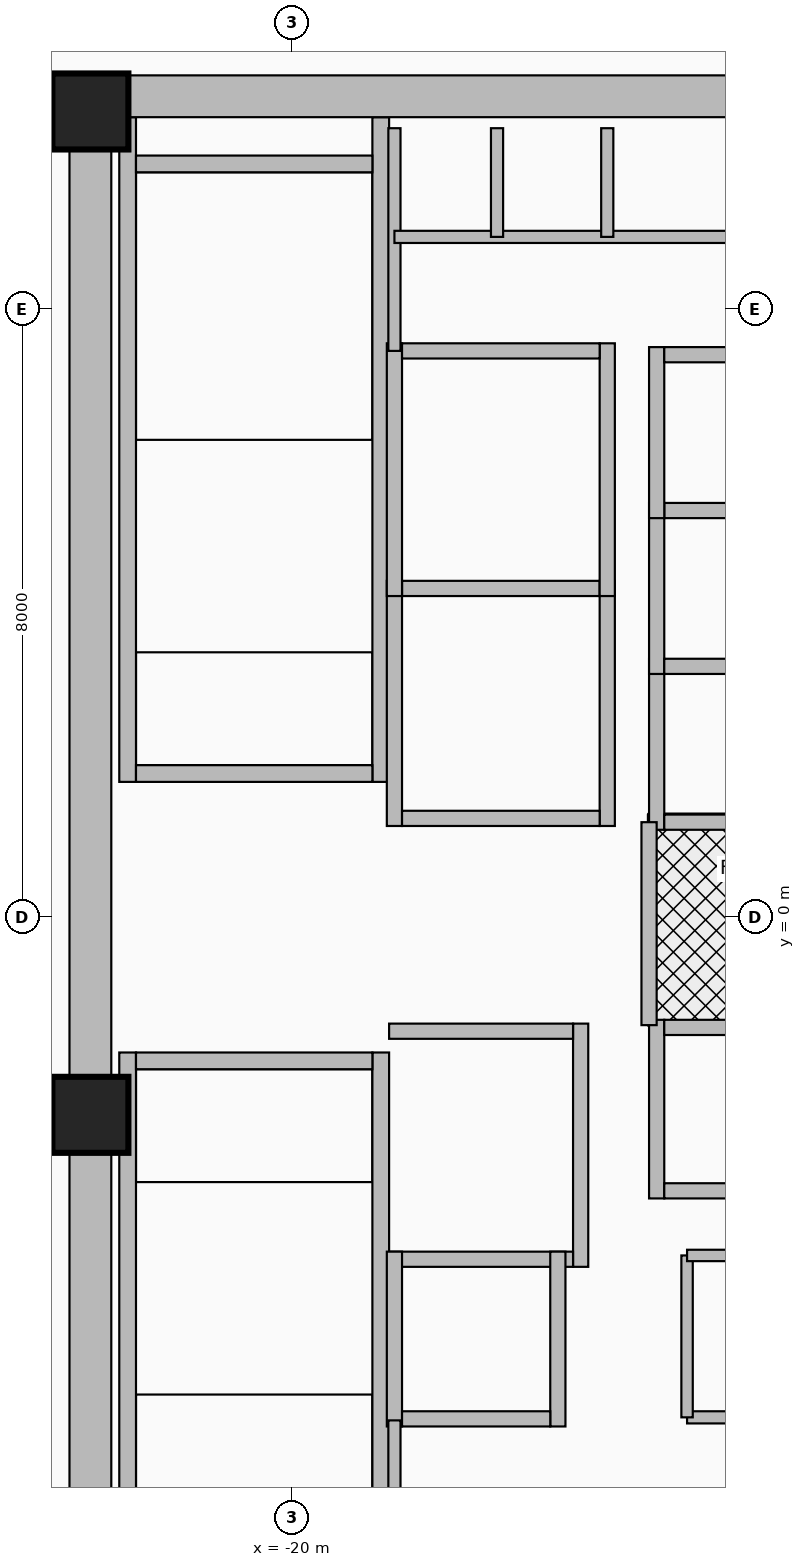
"""IFC4 building model, lengths in metres.
Left out: names, types, materials, properties, quantities, classifications, styles, units other than length and angle.
Written with IfcOpenShell. Run it as: python <this file> out.ifc"""

import sys

from ifc_helpers import new_model, si_unit, direction, frame, frame_2d, origin, origin_2d, place, context, subcontext, project, spatial, rectangle, extrude, source, transform, mapped, element, fill, save


model = new_model("IFC4")
c1 = context("Model", 3, precision=1e-05, world=origin(), true_north=direction((0.0, 1.0)))
c2 = subcontext(c1, "Body", "Model", "MODEL_VIEW")
j1 = project(units=[si_unit("LENGTHUNIT", "METRE"), si_unit("PLANEANGLEUNIT", "RADIAN")], contexts=[c1])
p1 = place(None, origin())
s1 = spatial("IfcSite", under=j1, at=p1, CompositionType="ELEMENT")
p2 = place(p1, origin())
s2 = spatial("IfcBuilding", under=s1, at=p2, CompositionType="ELEMENT")
p3 = place(p2, frame((0.0, 0.0, 180.5)))
s3 = spatial("IfcBuildingStorey", under=s2, at=p3, CompositionType="ELEMENT", Elevation=180.5)
for number, where, z_axis, x_axis in (
    (1, (-22.16, 1.78, 0.0), (0.0, 0.0, 1.0), (0.0, 1.0, 0.0)),
    (2, (-18.83, 1.78, 0.0), (0.0, 0.0, 1.0), (0.0, 1.0, 0.0)),
):
    element("IfcWall", number, at=place(p3, frame(where, z_axis=z_axis, x_axis=x_axis)), inside=s3, PredefinedType="SHEAR", context=c2, shape_type="SweptSolid", body=[
        extrude(rectangle(XDim=8.745, YDim=0.22, at=frame_2d((4.373, 0.0))), origin(), (0.0, 0.0, 1.0), 3.63),
    ])
p4 = place(p3, frame((-22.05, 1.89, 0.0), z_axis=(0.0, 0.0, 1.0), x_axis=(1.0, 0.0, 0.0)))
e3 = element("IfcWall", 3, at=p4, inside=s3, PredefinedType="SHEAR", context=c2, shape_type="SweptSolid", body=[
    extrude(rectangle(XDim=3.11, YDim=0.22, at=frame_2d((1.555, 0.0))), origin(), (0.0, 0.0, 1.0), 3.63),
])
p5 = place(p4, frame((1.0, 0.0, 0.0)))
e4 = element("IfcOpeningElement", 4, at=p5, cuts=e3, PredefinedType="OPENING", context=c2, shape_type="SweptSolid", body=[
    extrude(rectangle(XDim=1.1, YDim=2.15, at=frame_2d((0.55, 1.075))), frame((0.0, 0.125, 0.0), z_axis=(0.0, -1.0, 0.0), x_axis=(1.0, 0.0, 0.0)), (0.0, 0.0, 1.0), 0.25),
])
p6 = place(p3, frame((-22.05, 9.91, 0.0), z_axis=(0.0, 0.0, 1.0), x_axis=(1.0, 0.0, 0.0)))
e5 = element("IfcWall", 5, at=p6, inside=s3, PredefinedType="SHEAR", context=c2, shape_type="SweptSolid", body=[
    extrude(rectangle(XDim=3.11, YDim=0.22, at=frame_2d((1.555, 0.0))), origin(), (0.0, 0.0, 1.0), 3.63),
])
for number, where, z_axis, x_axis in (
    (6, (-22.16, -10.525, 0.0), (0.0, 0.0, 1.0), (0.0, 1.0, 0.0)),
    (7, (-18.83, -10.525, 0.0), (0.0, 0.0, 1.0), (0.0, 1.0, 0.0)),
):
    element("IfcWall", number, at=place(p3, frame(where, z_axis=z_axis, x_axis=x_axis)), inside=s3, PredefinedType="SHEAR", context=c2, shape_type="SweptSolid", body=[
        extrude(rectangle(XDim=8.745, YDim=0.22, at=frame_2d((4.373, 0.0))), origin(), (0.0, 0.0, 1.0), 3.63),
    ])
p7 = place(p3, frame((-22.05, -1.89, 0.0), z_axis=(0.0, 0.0, 1.0), x_axis=(1.0, 0.0, 0.0)))
e8 = element("IfcWall", 8, at=p7, inside=s3, PredefinedType="SHEAR", context=c2, shape_type="SweptSolid", body=[
    extrude(rectangle(XDim=3.11, YDim=0.22, at=frame_2d((1.555, 0.0))), origin(), (0.0, 0.0, 1.0), 3.63),
])
p8 = place(p7, frame((1.0, 0.0, 0.0)))
e9 = element("IfcOpeningElement", 9, at=p8, cuts=e8, PredefinedType="OPENING", context=c2, shape_type="SweptSolid", body=[
    extrude(rectangle(XDim=1.1, YDim=2.15, at=frame_2d((0.55, 1.075))), frame((0.0, 0.125, 0.0), z_axis=(0.0, -1.0, 0.0), x_axis=(1.0, 0.0, 0.0)), (0.0, 0.0, 1.0), 0.25),
])
p9 = place(p3, frame((-22.65, -11.075, 0.0), z_axis=(0.0, 0.0, 1.0), x_axis=(0.0, 1.0, 0.0)))
e10 = element("IfcWall", 10, at=p9, inside=s3, PredefinedType="SHEAR", context=c2, shape_type="SweptSolid", body=[
    extrude(rectangle(XDim=22.15, YDim=0.55, at=frame_2d((11.075, 0.0))), origin(), (0.0, 0.0, 1.0), 3.63),
])
p10 = place(p3, frame((-22.65, 10.8, 0.0), z_axis=(0.0, 0.0, 1.0), x_axis=(1.0, 0.0, 0.0)))
e11 = element("IfcWall", 11, at=p10, inside=s3, PredefinedType="SHEAR", context=c2, shape_type="SweptSolid", body=[
    extrude(rectangle(XDim=10.25, YDim=0.55, at=frame_2d((5.125, 0.0))), origin(), (0.0, 0.0, 1.0), 3.63),
])
m1 = source(origin(), c2, "Body", "SweptSolid", [
    extrude(rectangle(XDim=1.0, YDim=1.0, at=origin_2d()), origin(), (0.0, 0.0, 1.0), 3.95),
])
for number, where, z_axis, x_axis in (
    (12, (-22.65, -2.6, 0.0), (0.0, 0.0, 1.0), (1.0, 0.0, 0.0)),
    (13, (-22.65, 10.6, 0.0), (0.0, 0.0, 1.0), (1.0, 0.0, 0.0)),
):
    element("IfcColumn", number, at=place(p3, frame(where, z_axis=z_axis, x_axis=x_axis)), inside=s3, PredefinedType="COLUMN", context=c2, shape_type="MappedRepresentation", body=[
        mapped(m1, transform((0.0, 0.0, 0.0), x_axis=(1.0, 0.0, 0.0), y_axis=(0.0, 1.0, 0.0), z_axis=(0.0, 0.0, 1.0), scale=1.0)),
    ])
for number, where, z_axis, x_axis in (
    (14, (-18.65, 1.2, 0.0), (0.0, 0.0, 1.0), (0.0, 1.0, 0.0)),
    (15, (-15.85, 1.2, 0.0), (0.0, 0.0, 1.0), (0.0, 1.0, 0.0)),
):
    element("IfcWall", number, at=place(p3, frame(where, z_axis=z_axis, x_axis=x_axis)), inside=s3, PredefinedType="MOVABLE", context=c2, shape_type="SweptSolid", body=[
        extrude(rectangle(XDim=3.225, YDim=0.2, at=frame_2d((1.613, 0.0))), origin(), (0.0, 0.0, 1.0), 3.63),
    ])
p11 = place(p3, frame((-18.55, 1.3, 0.0), z_axis=(0.0, 0.0, 1.0), x_axis=(1.0, 0.0, 0.0)))
e16 = element("IfcWall", 16, at=p11, inside=s3, PredefinedType="MOVABLE", context=c2, shape_type="SweptSolid", body=[
    extrude(rectangle(XDim=2.6, YDim=0.2, at=frame_2d((1.3, 0.0))), origin(), (0.0, 0.0, 1.0), 3.63),
])
p12 = place(p11, frame((0.7, 0.0, 0.0)))
e17 = element("IfcOpeningElement", 17, at=p12, cuts=e16, PredefinedType="OPENING", context=c2, shape_type="SweptSolid", body=[
    extrude(rectangle(XDim=1.2, YDim=2.1, at=frame_2d((0.6, 1.05))), frame((0.0, 0.115, 0.0), z_axis=(0.0, -1.0, 0.0), x_axis=(1.0, 0.0, 0.0)), (0.0, 0.0, 1.0), 0.23),
])
p13 = place(p3, frame((-18.55, 4.325, 0.0), z_axis=(0.0, 0.0, 1.0), x_axis=(1.0, 0.0, 0.0)))
e18 = element("IfcWall", 18, at=p13, inside=s3, PredefinedType="MOVABLE", context=c2, shape_type="SweptSolid", body=[
    extrude(rectangle(XDim=2.6, YDim=0.2, at=frame_2d((1.3, 0.0))), origin(), (0.0, 0.0, 1.0), 3.63),
])
p14 = place(p3, frame((-16.2, -4.6, 0.0), z_axis=(0.0, 0.0, 1.0), x_axis=(0.0, 1.0, 0.0)))
e19 = element("IfcWall", 19, at=p14, inside=s3, PredefinedType="MOVABLE", context=c2, shape_type="SweptSolid", body=[
    extrude(rectangle(XDim=3.2, YDim=0.2, at=frame_2d((1.6, 0.0))), origin(), (0.0, 0.0, 1.0), 3.63),
])
p15 = place(p3, frame((-18.72, -4.5, 0.0), z_axis=(0.0, 0.0, 1.0), x_axis=(1.0, 0.0, 0.0)))
e20 = element("IfcWall", 20, at=p15, inside=s3, PredefinedType="MOVABLE", context=c2, shape_type="SweptSolid", body=[
    extrude(rectangle(XDim=2.42, YDim=0.2, at=frame_2d((1.21, 0.0))), origin(), (0.0, 0.0, 1.0), 3.63),
])
p16 = place(p3, frame((-18.72, -1.5, 0.0), z_axis=(0.0, 0.0, 1.0), x_axis=(1.0, 0.0, 0.0)))
e21 = element("IfcWall", 21, at=p16, inside=s3, PredefinedType="MOVABLE", context=c2, shape_type="SweptSolid", body=[
    extrude(rectangle(XDim=2.42, YDim=0.2, at=frame_2d((1.21, 0.0))), origin(), (0.0, 0.0, 1.0), 3.63),
])
p17 = place(p16, frame((0.61, 0.0, 0.0)))
e22 = element("IfcOpeningElement", 22, at=p17, cuts=e21, PredefinedType="OPENING", context=c2, shape_type="SweptSolid", body=[
    extrude(rectangle(XDim=1.2, YDim=2.1, at=frame_2d((0.6, 1.05))), frame((0.0, 0.115, 0.0), z_axis=(0.0, -1.0, 0.0), x_axis=(1.0, 0.0, 0.0)), (0.0, 0.0, 1.0), 0.23),
])
for number, where, z_axis, x_axis in (
    (23, (-18.65, 4.225, 0.0), (0.0, 0.0, 1.0), (0.0, 1.0, 0.0)),
    (24, (-15.85, 4.225, 0.0), (0.0, 0.0, 1.0), (0.0, 1.0, 0.0)),
):
    element("IfcWall", number, at=place(p3, frame(where, z_axis=z_axis, x_axis=x_axis)), inside=s3, PredefinedType="MOVABLE", context=c2, shape_type="SweptSolid", body=[
        extrude(rectangle(XDim=3.325, YDim=0.2, at=frame_2d((1.663, 0.0))), origin(), (0.0, 0.0, 1.0), 3.63),
    ])
p18 = place(p3, frame((-18.55, 7.45, 0.0), z_axis=(0.0, 0.0, 1.0), x_axis=(1.0, 0.0, 0.0)))
e25 = element("IfcWall", 25, at=p18, inside=s3, PredefinedType="MOVABLE", context=c2, shape_type="SweptSolid", body=[
    extrude(rectangle(XDim=2.6, YDim=0.2, at=frame_2d((1.3, 0.0))), origin(), (0.0, 0.0, 1.0), 3.63),
])
p19 = place(p18, frame((0.7, 0.0, 0.0)))
e26 = element("IfcOpeningElement", 26, at=p19, cuts=e25, PredefinedType="OPENING", context=c2, shape_type="SweptSolid", body=[
    extrude(rectangle(XDim=1.2, YDim=2.1, at=frame_2d((0.6, 1.05))), frame((0.0, 0.115, 0.0), z_axis=(0.0, -1.0, 0.0), x_axis=(1.0, 0.0, 0.0)), (0.0, 0.0, 1.0), 0.23),
])
p20 = place(p3, frame((-15.2, 1.15, 0.0), z_axis=(0.0, 0.0, 1.0), x_axis=(0.0, 1.0, 0.0)))
e27 = element("IfcWall", 27, at=p20, inside=s3, PredefinedType="MOVABLE", context=c2, shape_type="SweptSolid", body=[
    extrude(rectangle(XDim=2.25, YDim=0.2, at=frame_2d((1.125, 0.0))), origin(), (0.0, 0.0, 1.0), 3.63),
])
p21 = place(p3, frame((-15.1, 1.25, 0.0), z_axis=(0.0, 0.0, 1.0), x_axis=(1.0, 0.0, 0.0)))
e28 = element("IfcWall", 28, at=p21, inside=s3, PredefinedType="MOVABLE", context=c2, shape_type="SweptSolid", body=[
    extrude(rectangle(XDim=1.92, YDim=0.2, at=frame_2d((0.96, 0.0))), origin(), (0.0, 0.0, 1.0), 3.63),
])
p22 = place(p3, frame((-15.2, 3.2, 0.0), z_axis=(0.0, 0.0, 1.0), x_axis=(0.0, 1.0, 0.0)))
e29 = element("IfcWall", 29, at=p22, inside=s3, PredefinedType="MOVABLE", context=c2, shape_type="SweptSolid", body=[
    extrude(rectangle(XDim=2.25, YDim=0.2, at=frame_2d((1.125, 0.0))), origin(), (0.0, 0.0, 1.0), 3.63),
])
for number, where, z_axis, x_axis in (
    (30, (-15.1, 3.3, 0.0), (0.0, 0.0, 1.0), (1.0, 0.0, 0.0)),
    (31, (-15.1, 5.35, 0.0), (0.0, 0.0, 1.0), (1.0, 0.0, 0.0)),
):
    element("IfcWall", number, at=place(p3, frame(where, z_axis=z_axis, x_axis=x_axis)), inside=s3, PredefinedType="MOVABLE", context=c2, shape_type="SweptSolid", body=[
        extrude(rectangle(XDim=1.92, YDim=0.2, at=frame_2d((0.96, 0.0))), origin(), (0.0, 0.0, 1.0), 3.63),
    ])
p23 = place(p3, frame((-15.2, 5.25, 0.0), z_axis=(0.0, 0.0, 1.0), x_axis=(0.0, 1.0, 0.0)))
e32 = element("IfcWall", 32, at=p23, inside=s3, PredefinedType="MOVABLE", context=c2, shape_type="SweptSolid", body=[
    extrude(rectangle(XDim=2.25, YDim=0.2, at=frame_2d((1.125, 0.0))), origin(), (0.0, 0.0, 1.0), 3.63),
])
p24 = place(p3, frame((-15.1, 7.4, 0.0), z_axis=(0.0, 0.0, 1.0), x_axis=(1.0, 0.0, 0.0)))
e33 = element("IfcWall", 33, at=p24, inside=s3, PredefinedType="MOVABLE", context=c2, shape_type="SweptSolid", body=[
    extrude(rectangle(XDim=1.92, YDim=0.2, at=frame_2d((0.96, 0.0))), origin(), (0.0, 0.0, 1.0), 3.63),
])
for number, where, z_axis, x_axis in (
    (34, (-18.65, -6.7, 0.0), (0.0, 0.0, 1.0), (0.0, 1.0, 0.0)),
    (35, (-16.5, -6.7, 0.0), (0.0, 0.0, 1.0), (0.0, 1.0, 0.0)),
):
    element("IfcWall", number, at=place(p3, frame(where, z_axis=z_axis, x_axis=x_axis)), inside=s3, PredefinedType="MOVABLE", context=c2, shape_type="SweptSolid", body=[
        extrude(rectangle(XDim=2.3, YDim=0.2, at=frame_2d((1.15, 0.0))), origin(), (0.0, 0.0, 1.0), 3.63),
    ])
p25 = place(p3, frame((-18.55, -6.6, 0.0), z_axis=(0.0, 0.0, 1.0), x_axis=(1.0, 0.0, 0.0)))
e36 = element("IfcWall", 36, at=p25, inside=s3, PredefinedType="MOVABLE", context=c2, shape_type="SweptSolid", body=[
    extrude(rectangle(XDim=1.95, YDim=0.2, at=frame_2d((0.975, 0.0))), origin(), (0.0, 0.0, 1.0), 3.63),
])
p26 = place(p3, frame((-15.2, -3.7, 0.0), z_axis=(0.0, 0.0, 1.0), x_axis=(0.0, 1.0, 0.0)))
e37 = element("IfcWall", 37, at=p26, inside=s3, PredefinedType="MOVABLE", context=c2, shape_type="SweptSolid", body=[
    extrude(rectangle(XDim=2.35, YDim=0.2, at=frame_2d((1.175, 0.0))), origin(), (0.0, 0.0, 1.0), 3.63),
])
for number, where, z_axis, x_axis in (
    (38, (-15.1, -3.6, 0.0), (0.0, 0.0, 1.0), (1.0, 0.0, 0.0)),
    (39, (-15.1, -1.45, 0.0), (0.0, 0.0, 1.0), (1.0, 0.0, 0.0)),
):
    element("IfcWall", number, at=place(p3, frame(where, z_axis=z_axis, x_axis=x_axis)), inside=s3, PredefinedType="MOVABLE", context=c2, shape_type="SweptSolid", body=[
        extrude(rectangle(XDim=1.92, YDim=0.2, at=frame_2d((0.96, 0.0))), origin(), (0.0, 0.0, 1.0), 3.63),
    ])
p27 = place(p3, frame((-15.3, -1.42, 0.0), z_axis=(0.0, 0.0, 1.0), x_axis=(0.0, 1.0, 0.0)))
e40 = element("IfcWall", 40, at=p27, inside=s3, PredefinedType="PARTITIONING", context=c2, shape_type="SweptSolid", body=[
    extrude(rectangle(XDim=2.67, YDim=0.2, at=frame_2d((1.335, 0.0))), origin(), (0.0, 0.0, 1.0), 3.63),
])
p28 = place(p27, frame((0.78, 0.0, 0.0)))
e41 = element("IfcOpeningElement", 41, at=p28, cuts=e40, PredefinedType="OPENING", context=c2, shape_type="SweptSolid", body=[
    extrude(rectangle(XDim=1.05, YDim=2.15, at=frame_2d((0.525, 1.075))), frame((0.0, 0.115, 0.0), z_axis=(0.0, -1.0, 0.0), x_axis=(1.0, 0.0, 0.0)), (0.0, 0.0, 1.0), 0.23),
])
p29 = place(p3, frame((-18.65, 7.45, 0.0), z_axis=(0.0, 0.0, 1.0), x_axis=(0.0, 1.0, 0.0)))
e42 = element("IfcWall", 42, at=p29, inside=s3, PredefinedType="PARTITIONING", context=c2, shape_type="SweptSolid", body=[
    extrude(rectangle(XDim=2.93, YDim=0.16, at=frame_2d((1.465, 0.0))), origin(), (0.0, 0.0, 1.0), 3.63),
])
p30 = place(p3, frame((-18.65, -8.18, 0.0), z_axis=(0.0, 0.0, 1.0), x_axis=(0.0, 1.0, 0.0)))
e43 = element("IfcWall", 43, at=p30, inside=s3, PredefinedType="PARTITIONING", context=c2, shape_type="SweptSolid", body=[
    extrude(rectangle(XDim=1.56, YDim=0.16, at=frame_2d((0.78, 0.0))), origin(), (0.0, 0.0, 1.0), 3.63),
])
p31 = place(p3, frame((-18.65, 8.95, 0.0), z_axis=(0.0, 0.0, 1.0), x_axis=(1.0, 0.0, 0.0)))
e44 = element("IfcWall", 44, at=p31, inside=s3, PredefinedType="PARTITIONING", context=c2, shape_type="SweptSolid", body=[
    extrude(rectangle(XDim=5.5, YDim=0.16, at=frame_2d((2.75, 0.0))), origin(), (0.0, 0.0, 1.0), 3.63),
])
p32 = place(p31, frame((0.3, 0.0, 0.0)))
e45 = element("IfcOpeningElement", 45, at=p32, cuts=e44, PredefinedType="OPENING", context=c2, shape_type="SweptSolid", body=[
    extrude(rectangle(XDim=0.85, YDim=2.05, at=frame_2d((0.425, 1.025))), frame((0.0, 0.095, 0.0), z_axis=(0.0, -1.0, 0.0), x_axis=(1.0, 0.0, 0.0)), (0.0, 0.0, 1.0), 0.19),
])
p33 = place(p31, frame((3.2, 0.0, 0.0)))
e46 = element("IfcOpeningElement", 46, at=p33, cuts=e44, PredefinedType="OPENING", context=c2, shape_type="SweptSolid", body=[
    extrude(rectangle(XDim=0.85, YDim=2.05, at=frame_2d((0.425, 1.025))), frame((0.0, 0.095, 0.0), z_axis=(0.0, -1.0, 0.0), x_axis=(1.0, 0.0, 0.0)), (0.0, 0.0, 1.0), 0.19),
])
p34 = place(p3, frame((-17.3, 8.95, 0.0), z_axis=(0.0, 0.0, 1.0), x_axis=(0.0, 1.0, 0.0)))
e47 = element("IfcWall", 47, at=p34, inside=s3, PredefinedType="PARTITIONING", context=c2, shape_type="SweptSolid", body=[
    extrude(rectangle(XDim=1.43, YDim=0.16, at=frame_2d((0.715, 0.0))), origin(), (0.0, 0.0, 1.0), 3.63),
])
p35 = place(p3, frame((-15.85, 8.95, 0.0), z_axis=(0.0, 0.0, 1.0), x_axis=(0.0, 1.0, 0.0)))
e48 = element("IfcWall", 48, at=p35, inside=s3, PredefinedType="PARTITIONING", context=c2, shape_type="SweptSolid", body=[
    extrude(rectangle(XDim=1.43, YDim=0.16, at=frame_2d((0.715, 0.0))), origin(), (0.0, 0.0, 1.0), 3.63),
])
p36 = place(p35, frame((0.29, 0.0, 0.0)))
e49 = element("IfcOpeningElement", 49, at=p36, cuts=e48, PredefinedType="OPENING", context=c2, shape_type="SweptSolid", body=[
    extrude(rectangle(XDim=0.85, YDim=2.05, at=frame_2d((0.425, 1.025))), frame((0.0, 0.095, 0.0), z_axis=(0.0, -1.0, 0.0), x_axis=(1.0, 0.0, 0.0)), (0.0, 0.0, 1.0), 0.19),
])
p37 = place(p3, frame((-14.8, -6.58, 0.0), z_axis=(0.0, 0.0, 1.0), x_axis=(1.0, 0.0, 0.0)))
e50 = element("IfcWall", 50, at=p37, inside=s3, PredefinedType="PARTITIONING", context=c2, shape_type="SweptSolid", body=[
    extrude(rectangle(XDim=1.65, YDim=0.16, at=frame_2d((0.825, 0.0))), origin(), (0.0, 0.0, 1.0), 3.63),
])
p38 = place(p37, frame((0.5, 0.0, 0.0)))
e51 = element("IfcOpeningElement", 51, at=p38, cuts=e50, PredefinedType="OPENING", context=c2, shape_type="SweptSolid", body=[
    extrude(rectangle(XDim=0.85, YDim=2.05, at=frame_2d((0.425, 1.025))), frame((0.0, 0.095, 0.0), z_axis=(0.0, -1.0, 0.0), x_axis=(1.0, 0.0, 0.0)), (0.0, 0.0, 1.0), 0.19),
])
p39 = place(p3, frame((-14.8, -6.58, 0.0), z_axis=(0.0, 0.0, 1.0), x_axis=(0.0, 1.0, 0.0)))
e52 = element("IfcWall", 52, at=p39, inside=s3, PredefinedType="PARTITIONING", context=c2, shape_type="SweptSolid", body=[
    extrude(rectangle(XDim=2.13, YDim=0.15, at=frame_2d((1.065, 0.0))), origin(), (0.0, 0.0, 1.0), 3.63),
])
p40 = place(p3, frame((-14.8, -4.45, 0.0), z_axis=(0.0, 0.0, 1.0), x_axis=(1.0, 0.0, 0.0)))
e53 = element("IfcWall", 53, at=p40, inside=s3, PredefinedType="PARTITIONING", context=c2, shape_type="SweptSolid", body=[
    extrude(rectangle(XDim=1.65, YDim=0.15, at=frame_2d((0.825, 0.0))), origin(), (0.0, 0.0, 1.0), 3.63),
])
p41 = place(p12, origin())
e54 = element("IfcDoor", 54, at=p41, inside=s3, OperationType="DOUBLE_DOOR_SLIDING", PredefinedType="DOOR", context=c2, shape_type="SweptSolid", body=[
    extrude(rectangle(XDim=1.2, YDim=2.1, at=frame_2d((0.6, 1.05))), frame((0.0, 0.025, 0.0), z_axis=(0.0, -1.0, 0.0), x_axis=(1.0, 0.0, 0.0)), (0.0, 0.0, 1.0), 0.05),
])
fill(e17, e54)
p42 = place(p17, origin())
e55 = element("IfcDoor", 55, at=p42, inside=s3, OperationType="DOUBLE_DOOR_SLIDING", PredefinedType="DOOR", context=c2, shape_type="SweptSolid", body=[
    extrude(rectangle(XDim=1.2, YDim=2.1, at=frame_2d((0.6, 1.05))), frame((0.0, 0.025, 0.0), z_axis=(0.0, -1.0, 0.0), x_axis=(1.0, 0.0, 0.0)), (0.0, 0.0, 1.0), 0.05),
])
fill(e22, e55)
p43 = place(p19, origin())
e56 = element("IfcDoor", 56, at=p43, inside=s3, OperationType="DOUBLE_DOOR_SLIDING", PredefinedType="DOOR", context=c2, shape_type="SweptSolid", body=[
    extrude(rectangle(XDim=1.2, YDim=2.1, at=frame_2d((0.6, 1.05))), frame((0.0, 0.025, 0.0), z_axis=(0.0, -1.0, 0.0), x_axis=(1.0, 0.0, 0.0)), (0.0, 0.0, 1.0), 0.05),
])
fill(e26, e56)
p44 = place(p28, origin())
e57 = element("IfcDoor", 57, at=p44, inside=s3, OperationType="SINGLE_SWING_RIGHT", PredefinedType="DOOR", context=c2, shape_type="SweptSolid", body=[
    extrude(rectangle(XDim=1.05, YDim=2.15, at=frame_2d((0.525, 1.075))), frame((0.0, 0.025, 0.0), z_axis=(0.0, -1.0, 0.0), x_axis=(1.0, 0.0, 0.0)), (0.0, 0.0, 1.0), 0.05),
])
fill(e41, e57)
p45 = place(p5, frame((1.1, 0.0, 0.0), z_axis=(0.0, 0.0, 1.0), x_axis=(-1.0, 0.0, 0.0)))
e58 = element("IfcDoor", 58, at=p45, inside=s3, OperationType="SINGLE_SWING_LEFT", PredefinedType="DOOR", context=c2, shape_type="SweptSolid", body=[
    extrude(rectangle(XDim=1.1, YDim=2.15, at=frame_2d((0.55, 1.075))), frame((0.0, 0.025, 0.0), z_axis=(0.0, -1.0, 0.0), x_axis=(1.0, 0.0, 0.0)), (0.0, 0.0, 1.0), 0.05),
])
fill(e4, e58)
p46 = place(p8, origin())
e59 = element("IfcDoor", 59, at=p46, inside=s3, OperationType="SINGLE_SWING_RIGHT", PredefinedType="DOOR", context=c2, shape_type="SweptSolid", body=[
    extrude(rectangle(XDim=1.1, YDim=2.15, at=frame_2d((0.55, 1.075))), frame((0.0, 0.025, 0.0), z_axis=(0.0, -1.0, 0.0), x_axis=(1.0, 0.0, 0.0)), (0.0, 0.0, 1.0), 0.05),
])
fill(e9, e59)
p47 = place(p32, origin())
e60 = element("IfcDoor", 60, at=p47, inside=s3, OperationType="SINGLE_SWING_LEFT", PredefinedType="DOOR", context=c2, shape_type="SweptSolid", body=[
    extrude(rectangle(XDim=0.85, YDim=2.05, at=frame_2d((0.425, 1.025))), frame((0.0, 0.025, 0.0), z_axis=(0.0, -1.0, 0.0), x_axis=(1.0, 0.0, 0.0)), (0.0, 0.0, 1.0), 0.05),
])
fill(e45, e60)
p48 = place(p33, origin())
e61 = element("IfcDoor", 61, at=p48, inside=s3, OperationType="SINGLE_SWING_RIGHT", PredefinedType="DOOR", context=c2, shape_type="SweptSolid", body=[
    extrude(rectangle(XDim=0.85, YDim=2.05, at=frame_2d((0.425, 1.025))), frame((0.0, 0.025, 0.0), z_axis=(0.0, -1.0, 0.0), x_axis=(1.0, 0.0, 0.0)), (0.0, 0.0, 1.0), 0.05),
])
fill(e46, e61)
p49 = place(p36, origin())
e62 = element("IfcDoor", 62, at=p49, inside=s3, OperationType="SINGLE_SWING_LEFT", PredefinedType="DOOR", context=c2, shape_type="SweptSolid", body=[
    extrude(rectangle(XDim=0.85, YDim=2.05, at=frame_2d((0.425, 1.025))), frame((0.0, 0.025, 0.0), z_axis=(0.0, -1.0, 0.0), x_axis=(1.0, 0.0, 0.0)), (0.0, 0.0, 1.0), 0.05),
])
fill(e49, e62)
save(model, sys.argv[1])
